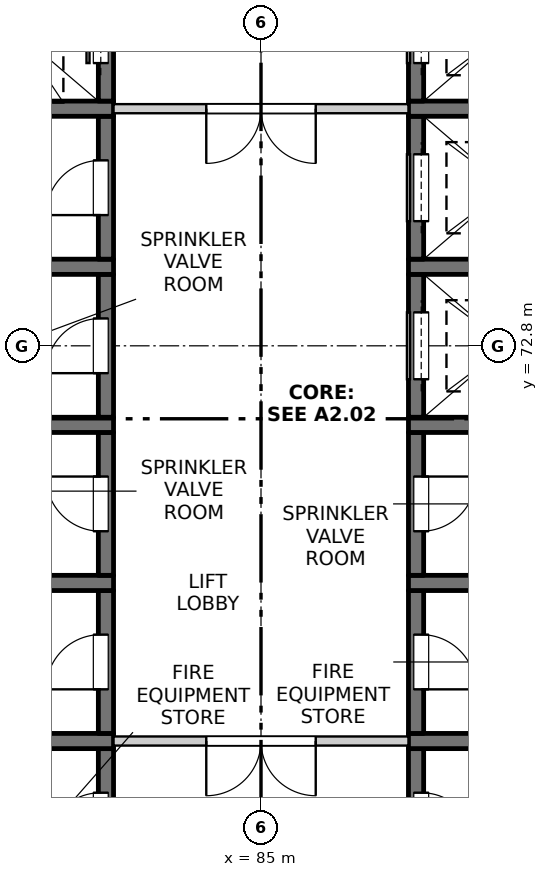
"""IFC4 building model, lengths in metres.
Left out: names, types, materials, properties, quantities, classifications, styles, units other than length and angle.
Written with IfcOpenShell. Run it as: python <this file> out.ifc"""

import sys

from ifc_helpers import new_model, si_unit, direction, frame, frame_2d, origin, place, context, subcontext, project, spatial, rectangle, extrude, element, fill, save


model = new_model("IFC4")
c1 = context("Model", 3, precision=1e-05, world=origin(), true_north=direction((0.0, 1.0)))
c2 = subcontext(c1, "Body", "Model", "MODEL_VIEW")
j1 = project(units=[si_unit("LENGTHUNIT", "METRE"), si_unit("PLANEANGLEUNIT", "RADIAN")], contexts=[c1])
p1 = place(None, origin())
s1 = spatial("IfcSite", under=j1, at=p1, CompositionType="ELEMENT")
p2 = place(p1, origin())
s2 = spatial("IfcBuilding", under=s1, at=p2, CompositionType="ELEMENT")
p3 = place(p2, frame((0.0, 0.0, 200.7)))
s3 = spatial("IfcBuildingStorey", under=s2, at=p3, CompositionType="ELEMENT", Elevation=200.7)
p4 = place(p3, frame((82.45, 63.825, -0.25), z_axis=(0.0, 0.0, 1.0), x_axis=(0.0, 1.0, 0.0)))
e1 = element("IfcWall", 1, at=p4, inside=s3, PredefinedType="SOLIDWALL", context=c2, shape_type="SweptSolid", body=[
    extrude(rectangle(XDim=2.35, YDim=0.25, at=frame_2d((1.175, 0.0))), origin(), (0.0, 0.0, 1.0), 3.4),
])
p5 = place(p4, frame((0.725, 0.0, 0.25)))
e2 = element("IfcOpeningElement", 2, at=p5, cuts=e1, PredefinedType="OPENING", context=c2, shape_type="SweptSolid", body=[
    extrude(rectangle(XDim=0.9, YDim=2.1, at=frame_2d((0.45, 1.05))), frame((0.0, 0.135, 0.0), z_axis=(0.0, -1.0, 0.0), x_axis=(1.0, 0.0, 0.0)), (0.0, 0.0, 1.0), 0.27),
])
p6 = place(p3, frame((79.575, 66.3, -0.25), z_axis=(0.0, 0.0, 1.0), x_axis=(1.0, 0.0, 0.0)))
e3 = element("IfcWall", 3, at=p6, inside=s3, PredefinedType="SOLIDWALL", context=c2, shape_type="SweptSolid", body=[
    extrude(rectangle(XDim=3.0, YDim=0.25, at=frame_2d((1.5, 0.0))), origin(), (0.0, 0.0, 1.0), 3.4),
])
p7 = place(p3, frame((82.45, 66.425, -0.25), z_axis=(0.0, 0.0, 1.0), x_axis=(0.0, 1.0, 0.0)))
e4 = element("IfcWall", 4, at=p7, inside=s3, PredefinedType="SOLIDWALL", context=c2, shape_type="SweptSolid", body=[
    extrude(rectangle(XDim=2.35, YDim=0.25, at=frame_2d((1.175, 0.0))), origin(), (0.0, 0.0, 1.0), 3.4),
])
p8 = place(p7, frame((0.725, 0.0, 0.25)))
e5 = element("IfcOpeningElement", 5, at=p8, cuts=e4, PredefinedType="OPENING", context=c2, shape_type="SweptSolid", body=[
    extrude(rectangle(XDim=0.9, YDim=2.1, at=frame_2d((0.45, 1.05))), frame((0.0, 0.135, 0.0), z_axis=(0.0, -1.0, 0.0), x_axis=(1.0, 0.0, 0.0)), (0.0, 0.0, 1.0), 0.27),
])
p9 = place(p3, frame((79.575, 68.9, -0.25), z_axis=(0.0, 0.0, 1.0), x_axis=(1.0, 0.0, 0.0)))
e6 = element("IfcWall", 6, at=p9, inside=s3, PredefinedType="SOLIDWALL", context=c2, shape_type="SweptSolid", body=[
    extrude(rectangle(XDim=3.0, YDim=0.25, at=frame_2d((1.5, 0.0))), origin(), (0.0, 0.0, 1.0), 3.4),
])
p10 = place(p3, frame((82.45, 69.025, -0.25), z_axis=(0.0, 0.0, 1.0), x_axis=(0.0, 1.0, 0.0)))
e7 = element("IfcWall", 7, at=p10, inside=s3, PredefinedType="SOLIDWALL", context=c2, shape_type="SweptSolid", body=[
    extrude(rectangle(XDim=2.35, YDim=0.25, at=frame_2d((1.175, 0.0))), origin(), (0.0, 0.0, 1.0), 3.4),
])
p11 = place(p10, frame((0.725, 0.0, 0.25)))
e8 = element("IfcOpeningElement", 8, at=p11, cuts=e7, PredefinedType="OPENING", context=c2, shape_type="SweptSolid", body=[
    extrude(rectangle(XDim=0.9, YDim=2.1, at=frame_2d((0.45, 1.05))), frame((0.0, 0.135, 0.0), z_axis=(0.0, -1.0, 0.0), x_axis=(1.0, 0.0, 0.0)), (0.0, 0.0, 1.0), 0.27),
])
p12 = place(p3, frame((79.575, 71.5, -0.25), z_axis=(0.0, 0.0, 1.0), x_axis=(1.0, 0.0, 0.0)))
e9 = element("IfcWall", 9, at=p12, inside=s3, PredefinedType="SOLIDWALL", context=c2, shape_type="SweptSolid", body=[
    extrude(rectangle(XDim=3.0, YDim=0.25, at=frame_2d((1.5, 0.0))), origin(), (0.0, 0.0, 1.0), 3.4),
])
p13 = place(p3, frame((82.45, 71.625, -0.25), z_axis=(0.0, 0.0, 1.0), x_axis=(0.0, 1.0, 0.0)))
e10 = element("IfcWall", 10, at=p13, inside=s3, PredefinedType="SOLIDWALL", context=c2, shape_type="SweptSolid", body=[
    extrude(rectangle(XDim=2.35, YDim=0.25, at=frame_2d((1.175, 0.0))), origin(), (0.0, 0.0, 1.0), 3.4),
])
p14 = place(p13, frame((0.725, 0.0, 0.25)))
e11 = element("IfcOpeningElement", 11, at=p14, cuts=e10, PredefinedType="OPENING", context=c2, shape_type="SweptSolid", body=[
    extrude(rectangle(XDim=0.9, YDim=2.1, at=frame_2d((0.45, 1.05))), frame((0.0, 0.135, 0.0), z_axis=(0.0, -1.0, 0.0), x_axis=(1.0, 0.0, 0.0)), (0.0, 0.0, 1.0), 0.27),
])
p15 = place(p3, frame((79.575, 74.1, -0.25), z_axis=(0.0, 0.0, 1.0), x_axis=(1.0, 0.0, 0.0)))
e12 = element("IfcWall", 12, at=p15, inside=s3, PredefinedType="SOLIDWALL", context=c2, shape_type="SweptSolid", body=[
    extrude(rectangle(XDim=3.0, YDim=0.25, at=frame_2d((1.5, 0.0))), origin(), (0.0, 0.0, 1.0), 3.4),
])
p16 = place(p3, frame((82.45, 74.225, -0.25), z_axis=(0.0, 0.0, 1.0), x_axis=(0.0, 1.0, 0.0)))
e13 = element("IfcWall", 13, at=p16, inside=s3, PredefinedType="SOLIDWALL", context=c2, shape_type="SweptSolid", body=[
    extrude(rectangle(XDim=2.35, YDim=0.25, at=frame_2d((1.175, 0.0))), origin(), (0.0, 0.0, 1.0), 3.4),
])
p17 = place(p16, frame((0.725, 0.0, 0.25)))
e14 = element("IfcOpeningElement", 14, at=p17, cuts=e13, PredefinedType="OPENING", context=c2, shape_type="SweptSolid", body=[
    extrude(rectangle(XDim=0.9, YDim=2.1, at=frame_2d((0.45, 1.05))), frame((0.0, 0.135, 0.0), z_axis=(0.0, -1.0, 0.0), x_axis=(1.0, 0.0, 0.0)), (0.0, 0.0, 1.0), 0.27),
])
p18 = place(p3, frame((79.575, 76.7, -0.25), z_axis=(0.0, 0.0, 1.0), x_axis=(1.0, 0.0, 0.0)))
e15 = element("IfcWall", 15, at=p18, inside=s3, PredefinedType="SOLIDWALL", context=c2, shape_type="SweptSolid", body=[
    extrude(rectangle(XDim=3.0, YDim=0.25, at=frame_2d((1.5, 0.0))), origin(), (0.0, 0.0, 1.0), 3.4),
])
p19 = place(p3, frame((82.45, 76.825, -0.25), z_axis=(0.0, 0.0, 1.0), x_axis=(0.0, 1.0, 0.0)))
e16 = element("IfcWall", 16, at=p19, inside=s3, PredefinedType="SOLIDWALL", context=c2, shape_type="SweptSolid", body=[
    extrude(rectangle(XDim=2.35, YDim=0.25, at=frame_2d((1.175, 0.0))), origin(), (0.0, 0.0, 1.0), 3.4),
])
p20 = place(p19, frame((0.625, 0.0, 0.25)))
e17 = element("IfcOpeningElement", 17, at=p20, cuts=e16, PredefinedType="OPENING", context=c2, shape_type="SweptSolid", body=[
    extrude(rectangle(XDim=1.1, YDim=2.1, at=frame_2d((0.55, 1.05))), frame((0.0, 0.135, 0.0), z_axis=(0.0, -1.0, 0.0), x_axis=(1.0, 0.0, 0.0)), (0.0, 0.0, 1.0), 0.27),
])
p21 = place(p3, frame((87.55, 63.825, -0.25), z_axis=(0.0, 0.0, 1.0), x_axis=(0.0, 1.0, 0.0)))
e18 = element("IfcWall", 18, at=p21, inside=s3, PredefinedType="SOLIDWALL", context=c2, shape_type="SweptSolid", body=[
    extrude(rectangle(XDim=2.35, YDim=0.25, at=frame_2d((1.175, 0.0))), origin(), (0.0, 0.0, 1.0), 3.4),
])
p22 = place(p21, frame((0.725, 0.0, 0.25)))
e19 = element("IfcOpeningElement", 19, at=p22, cuts=e18, PredefinedType="OPENING", context=c2, shape_type="SweptSolid", body=[
    extrude(rectangle(XDim=0.9, YDim=2.1, at=frame_2d((0.45, 1.05))), frame((0.0, 0.135, 0.0), z_axis=(0.0, -1.0, 0.0), x_axis=(1.0, 0.0, 0.0)), (0.0, 0.0, 1.0), 0.27),
])
p23 = place(p3, frame((87.425, 66.3, -0.25), z_axis=(0.0, 0.0, 1.0), x_axis=(1.0, 0.0, 0.0)))
e20 = element("IfcWall", 20, at=p23, inside=s3, PredefinedType="SOLIDWALL", context=c2, shape_type="SweptSolid", body=[
    extrude(rectangle(XDim=3.0, YDim=0.25, at=frame_2d((1.5, 0.0))), origin(), (0.0, 0.0, 1.0), 3.4),
])
p24 = place(p3, frame((87.55, 66.425, -0.25), z_axis=(0.0, 0.0, 1.0), x_axis=(0.0, 1.0, 0.0)))
e21 = element("IfcWall", 21, at=p24, inside=s3, PredefinedType="SOLIDWALL", context=c2, shape_type="SweptSolid", body=[
    extrude(rectangle(XDim=2.35, YDim=0.25, at=frame_2d((1.175, 0.0))), origin(), (0.0, 0.0, 1.0), 3.4),
])
p25 = place(p24, frame((0.725, 0.0, 0.25)))
e22 = element("IfcOpeningElement", 22, at=p25, cuts=e21, PredefinedType="OPENING", context=c2, shape_type="SweptSolid", body=[
    extrude(rectangle(XDim=0.9, YDim=2.1, at=frame_2d((0.45, 1.05))), frame((0.0, 0.135, 0.0), z_axis=(0.0, -1.0, 0.0), x_axis=(1.0, 0.0, 0.0)), (0.0, 0.0, 1.0), 0.27),
])
p26 = place(p3, frame((87.425, 68.9, -0.25), z_axis=(0.0, 0.0, 1.0), x_axis=(1.0, 0.0, 0.0)))
e23 = element("IfcWall", 23, at=p26, inside=s3, PredefinedType="SOLIDWALL", context=c2, shape_type="SweptSolid", body=[
    extrude(rectangle(XDim=3.0, YDim=0.25, at=frame_2d((1.5, 0.0))), origin(), (0.0, 0.0, 1.0), 3.4),
])
p27 = place(p3, frame((87.55, 69.025, -0.25), z_axis=(0.0, 0.0, 1.0), x_axis=(0.0, 1.0, 0.0)))
e24 = element("IfcWall", 24, at=p27, inside=s3, PredefinedType="SOLIDWALL", context=c2, shape_type="SweptSolid", body=[
    extrude(rectangle(XDim=2.35, YDim=0.25, at=frame_2d((1.175, 0.0))), origin(), (0.0, 0.0, 1.0), 3.4),
])
p28 = place(p27, frame((0.725, 0.0, 0.25)))
e25 = element("IfcOpeningElement", 25, at=p28, cuts=e24, PredefinedType="OPENING", context=c2, shape_type="SweptSolid", body=[
    extrude(rectangle(XDim=0.9, YDim=2.1, at=frame_2d((0.45, 1.05))), frame((0.0, 0.135, 0.0), z_axis=(0.0, -1.0, 0.0), x_axis=(1.0, 0.0, 0.0)), (0.0, 0.0, 1.0), 0.27),
])
p29 = place(p3, frame((87.425, 71.5, -0.25), z_axis=(0.0, 0.0, 1.0), x_axis=(1.0, 0.0, 0.0)))
e26 = element("IfcWall", 26, at=p29, inside=s3, PredefinedType="SOLIDWALL", context=c2, shape_type="SweptSolid", body=[
    extrude(rectangle(XDim=3.0, YDim=0.25, at=frame_2d((1.5, 0.0))), origin(), (0.0, 0.0, 1.0), 3.4),
])
p30 = place(p3, frame((87.55, 71.625, -0.25), z_axis=(0.0, 0.0, 1.0), x_axis=(0.0, 1.0, 0.0)))
e27 = element("IfcWall", 27, at=p30, inside=s3, PredefinedType="SOLIDWALL", context=c2, shape_type="SweptSolid", body=[
    extrude(rectangle(XDim=2.35, YDim=0.25, at=frame_2d((1.175, 0.0))), origin(), (0.0, 0.0, 1.0), 3.4),
])
p31 = place(p30, frame((0.625, 0.0, 0.25)))
e28 = element("IfcOpeningElement", 28, at=p31, cuts=e27, PredefinedType="OPENING", context=c2, shape_type="SweptSolid", body=[
    extrude(rectangle(XDim=1.1, YDim=2.1, at=frame_2d((0.55, 1.05))), frame((0.0, 0.135, 0.0), z_axis=(0.0, -1.0, 0.0), x_axis=(1.0, 0.0, 0.0)), (0.0, 0.0, 1.0), 0.27),
])
p32 = place(p3, frame((87.425, 74.1, -0.25), z_axis=(0.0, 0.0, 1.0), x_axis=(1.0, 0.0, 0.0)))
e29 = element("IfcWall", 29, at=p32, inside=s3, PredefinedType="SOLIDWALL", context=c2, shape_type="SweptSolid", body=[
    extrude(rectangle(XDim=3.0, YDim=0.25, at=frame_2d((1.5, 0.0))), origin(), (0.0, 0.0, 1.0), 3.4),
])
p33 = place(p3, frame((87.55, 74.225, -0.25), z_axis=(0.0, 0.0, 1.0), x_axis=(0.0, 1.0, 0.0)))
e30 = element("IfcWall", 30, at=p33, inside=s3, PredefinedType="SOLIDWALL", context=c2, shape_type="SweptSolid", body=[
    extrude(rectangle(XDim=2.35, YDim=0.25, at=frame_2d((1.175, 0.0))), origin(), (0.0, 0.0, 1.0), 3.4),
])
p34 = place(p33, frame((0.625, 0.0, 0.25)))
e31 = element("IfcOpeningElement", 31, at=p34, cuts=e30, PredefinedType="OPENING", context=c2, shape_type="SweptSolid", body=[
    extrude(rectangle(XDim=1.1, YDim=2.1, at=frame_2d((0.55, 1.05))), frame((0.0, 0.135, 0.0), z_axis=(0.0, -1.0, 0.0), x_axis=(1.0, 0.0, 0.0)), (0.0, 0.0, 1.0), 0.27),
])
p35 = place(p3, frame((87.425, 76.7, -0.25), z_axis=(0.0, 0.0, 1.0), x_axis=(1.0, 0.0, 0.0)))
e32 = element("IfcWall", 32, at=p35, inside=s3, PredefinedType="SOLIDWALL", context=c2, shape_type="SweptSolid", body=[
    extrude(rectangle(XDim=3.0, YDim=0.25, at=frame_2d((1.5, 0.0))), origin(), (0.0, 0.0, 1.0), 3.4),
])
p36 = place(p3, frame((87.55, 76.825, -0.25), z_axis=(0.0, 0.0, 1.0), x_axis=(0.0, 1.0, 0.0)))
e33 = element("IfcWall", 33, at=p36, inside=s3, PredefinedType="SOLIDWALL", context=c2, shape_type="SweptSolid", body=[
    extrude(rectangle(XDim=2.35, YDim=0.25, at=frame_2d((1.175, 0.0))), origin(), (0.0, 0.0, 1.0), 3.4),
])
p37 = place(p36, frame((0.625, 0.0, 0.25)))
e34 = element("IfcOpeningElement", 34, at=p37, cuts=e33, PredefinedType="OPENING", context=c2, shape_type="SweptSolid", body=[
    extrude(rectangle(XDim=1.1, YDim=2.1, at=frame_2d((0.55, 1.05))), frame((0.0, 0.135, 0.0), z_axis=(0.0, -1.0, 0.0), x_axis=(1.0, 0.0, 0.0)), (0.0, 0.0, 1.0), 0.27),
])
p38 = place(p3, frame((82.575, 66.3, 0.0), z_axis=(0.0, 0.0, 1.0), x_axis=(1.0, 0.0, 0.0)))
e35 = element("IfcWall", 35, at=p38, inside=s3, PredefinedType="PARTITIONING", context=c2, shape_type="SweptSolid", body=[
    extrude(rectangle(XDim=4.85, YDim=0.15, at=frame_2d((2.425, 0.0))), origin(), (0.0, 0.0, 1.0), 3.15),
])
p39 = place(p38, frame((1.525, 0.0, 0.0)))
e36 = element("IfcOpeningElement", 36, at=p39, cuts=e35, PredefinedType="OPENING", context=c2, shape_type="SweptSolid", body=[
    extrude(rectangle(XDim=1.8, YDim=2.1, at=frame_2d((0.9, 1.05))), frame((0.0, 0.085, 0.0), z_axis=(0.0, -1.0, 0.0), x_axis=(1.0, 0.0, 0.0)), (0.0, 0.0, 1.0), 0.17),
])
p40 = place(p3, frame((82.575, 76.7, 0.0), z_axis=(0.0, 0.0, 1.0), x_axis=(1.0, 0.0, 0.0)))
e37 = element("IfcWall", 37, at=p40, inside=s3, PredefinedType="PARTITIONING", context=c2, shape_type="SweptSolid", body=[
    extrude(rectangle(XDim=4.85, YDim=0.15, at=frame_2d((2.425, 0.0))), origin(), (0.0, 0.0, 1.0), 3.15),
])
p41 = place(p40, frame((1.525, 0.0, 0.0)))
e38 = element("IfcOpeningElement", 38, at=p41, cuts=e37, PredefinedType="OPENING", context=c2, shape_type="SweptSolid", body=[
    extrude(rectangle(XDim=1.8, YDim=2.1, at=frame_2d((0.9, 1.05))), frame((0.0, 0.085, 0.0), z_axis=(0.0, -1.0, 0.0), x_axis=(1.0, 0.0, 0.0)), (0.0, 0.0, 1.0), 0.17),
])
p42 = place(p5, origin())
e39 = element("IfcDoor", 39, at=p42, inside=s3, OperationType="SINGLE_SWING_LEFT", PredefinedType="DOOR", context=c2, shape_type="SweptSolid", body=[
    extrude(rectangle(XDim=0.9, YDim=2.1, at=frame_2d((0.45, 1.05))), frame((0.0, 0.11, 0.0), z_axis=(0.0, -1.0, 0.0), x_axis=(1.0, 0.0, 0.0)), (0.0, 0.0, 1.0), 0.05),
])
fill(e2, e39)
p43 = place(p22, origin())
e40 = element("IfcDoor", 40, at=p43, inside=s3, OperationType="SINGLE_SWING_RIGHT", PredefinedType="DOOR", context=c2, shape_type="SweptSolid", body=[
    extrude(rectangle(XDim=0.9, YDim=2.1, at=frame_2d((0.45, 1.05))), frame((0.0, -0.06, 0.0), z_axis=(0.0, -1.0, 0.0), x_axis=(1.0, 0.0, 0.0)), (0.0, 0.0, 1.0), 0.05),
])
fill(e19, e40)
p44 = place(p39, origin())
e41 = element("IfcDoor", 41, at=p44, inside=s3, OperationType="DOUBLE_DOOR_SINGLE_SWING", PredefinedType="DOOR", context=c2, shape_type="SweptSolid", body=[
    extrude(rectangle(XDim=1.8, YDim=2.1, at=frame_2d((0.9, 1.05))), frame((0.0, 0.025, 0.0), z_axis=(0.0, -1.0, 0.0), x_axis=(1.0, 0.0, 0.0)), (0.0, 0.0, 1.0), 0.05),
])
fill(e36, e41)
p45 = place(p8, origin())
e42 = element("IfcDoor", 42, at=p45, inside=s3, OperationType="SINGLE_SWING_LEFT", PredefinedType="DOOR", context=c2, shape_type="SweptSolid", body=[
    extrude(rectangle(XDim=0.9, YDim=2.1, at=frame_2d((0.45, 1.05))), frame((0.0, 0.11, 0.0), z_axis=(0.0, -1.0, 0.0), x_axis=(1.0, 0.0, 0.0)), (0.0, 0.0, 1.0), 0.05),
])
fill(e5, e42)
p46 = place(p25, origin())
e43 = element("IfcDoor", 43, at=p46, inside=s3, OperationType="SINGLE_SWING_RIGHT", PredefinedType="DOOR", context=c2, shape_type="SweptSolid", body=[
    extrude(rectangle(XDim=0.9, YDim=2.1, at=frame_2d((0.45, 1.05))), frame((0.0, -0.06, 0.0), z_axis=(0.0, -1.0, 0.0), x_axis=(1.0, 0.0, 0.0)), (0.0, 0.0, 1.0), 0.05),
])
fill(e22, e43)
p47 = place(p11, origin())
e44 = element("IfcDoor", 44, at=p47, inside=s3, OperationType="SINGLE_SWING_RIGHT", PredefinedType="DOOR", context=c2, shape_type="SweptSolid", body=[
    extrude(rectangle(XDim=0.9, YDim=2.1, at=frame_2d((0.45, 1.05))), frame((0.0, 0.11, 0.0), z_axis=(0.0, -1.0, 0.0), x_axis=(1.0, 0.0, 0.0)), (0.0, 0.0, 1.0), 0.05),
])
fill(e8, e44)
p48 = place(p28, origin())
e45 = element("IfcDoor", 45, at=p48, inside=s3, OperationType="SINGLE_SWING_LEFT", PredefinedType="DOOR", context=c2, shape_type="SweptSolid", body=[
    extrude(rectangle(XDim=0.9, YDim=2.1, at=frame_2d((0.45, 1.05))), frame((0.0, -0.06, 0.0), z_axis=(0.0, -1.0, 0.0), x_axis=(1.0, 0.0, 0.0)), (0.0, 0.0, 1.0), 0.05),
])
fill(e25, e45)
p49 = place(p14, origin())
e46 = element("IfcDoor", 46, at=p49, inside=s3, OperationType="SINGLE_SWING_LEFT", PredefinedType="DOOR", context=c2, shape_type="SweptSolid", body=[
    extrude(rectangle(XDim=0.9, YDim=2.1, at=frame_2d((0.45, 1.05))), frame((0.0, 0.11, 0.0), z_axis=(0.0, -1.0, 0.0), x_axis=(1.0, 0.0, 0.0)), (0.0, 0.0, 1.0), 0.05),
])
fill(e11, e46)
p50 = place(p31, origin())
e47 = element("IfcDoor", 47, at=p50, inside=s3, OperationType="SLIDING_TO_LEFT", PredefinedType="DOOR", context=c2, shape_type="SweptSolid", body=[
    extrude(rectangle(XDim=1.1, YDim=2.1, at=frame_2d((0.55, 1.05))), frame((0.0, -0.06, 0.0), z_axis=(0.0, -1.0, 0.0), x_axis=(1.0, 0.0, 0.0)), (0.0, 0.0, 1.0), 0.05),
])
fill(e28, e47)
p51 = place(p17, origin())
e48 = element("IfcDoor", 48, at=p51, inside=s3, OperationType="SINGLE_SWING_LEFT", PredefinedType="DOOR", context=c2, shape_type="SweptSolid", body=[
    extrude(rectangle(XDim=0.9, YDim=2.1, at=frame_2d((0.45, 1.05))), frame((0.0, 0.11, 0.0), z_axis=(0.0, -1.0, 0.0), x_axis=(1.0, 0.0, 0.0)), (0.0, 0.0, 1.0), 0.05),
])
fill(e14, e48)
p52 = place(p34, origin())
e49 = element("IfcDoor", 49, at=p52, inside=s3, OperationType="SLIDING_TO_LEFT", PredefinedType="DOOR", context=c2, shape_type="SweptSolid", body=[
    extrude(rectangle(XDim=1.1, YDim=2.1, at=frame_2d((0.55, 1.05))), frame((0.0, -0.06, 0.0), z_axis=(0.0, -1.0, 0.0), x_axis=(1.0, 0.0, 0.0)), (0.0, 0.0, 1.0), 0.05),
])
fill(e31, e49)
p53 = place(p41, origin())
e50 = element("IfcDoor", 50, at=p53, inside=s3, OperationType="DOUBLE_DOOR_SINGLE_SWING", PredefinedType="DOOR", context=c2, shape_type="SweptSolid", body=[
    extrude(rectangle(XDim=1.8, YDim=2.1, at=frame_2d((0.9, 1.05))), frame((0.0, 0.025, 0.0), z_axis=(0.0, -1.0, 0.0), x_axis=(1.0, 0.0, 0.0)), (0.0, 0.0, 1.0), 0.05),
])
fill(e38, e50)
p54 = place(p20, origin())
e51 = element("IfcDoor", 51, at=p54, inside=s3, OperationType="SLIDING_TO_LEFT", PredefinedType="DOOR", context=c2, shape_type="SweptSolid", body=[
    extrude(rectangle(XDim=1.1, YDim=2.1, at=frame_2d((0.55, 1.05))), frame((0.0, 0.11, 0.0), z_axis=(0.0, -1.0, 0.0), x_axis=(1.0, 0.0, 0.0)), (0.0, 0.0, 1.0), 0.05),
])
fill(e17, e51)
p55 = place(p37, origin())
e52 = element("IfcDoor", 52, at=p55, inside=s3, OperationType="SLIDING_TO_LEFT", PredefinedType="DOOR", context=c2, shape_type="SweptSolid", body=[
    extrude(rectangle(XDim=1.1, YDim=2.1, at=frame_2d((0.55, 1.05))), frame((0.0, -0.06, 0.0), z_axis=(0.0, -1.0, 0.0), x_axis=(1.0, 0.0, 0.0)), (0.0, 0.0, 1.0), 0.05),
])
fill(e34, e52)
save(model, sys.argv[1])
